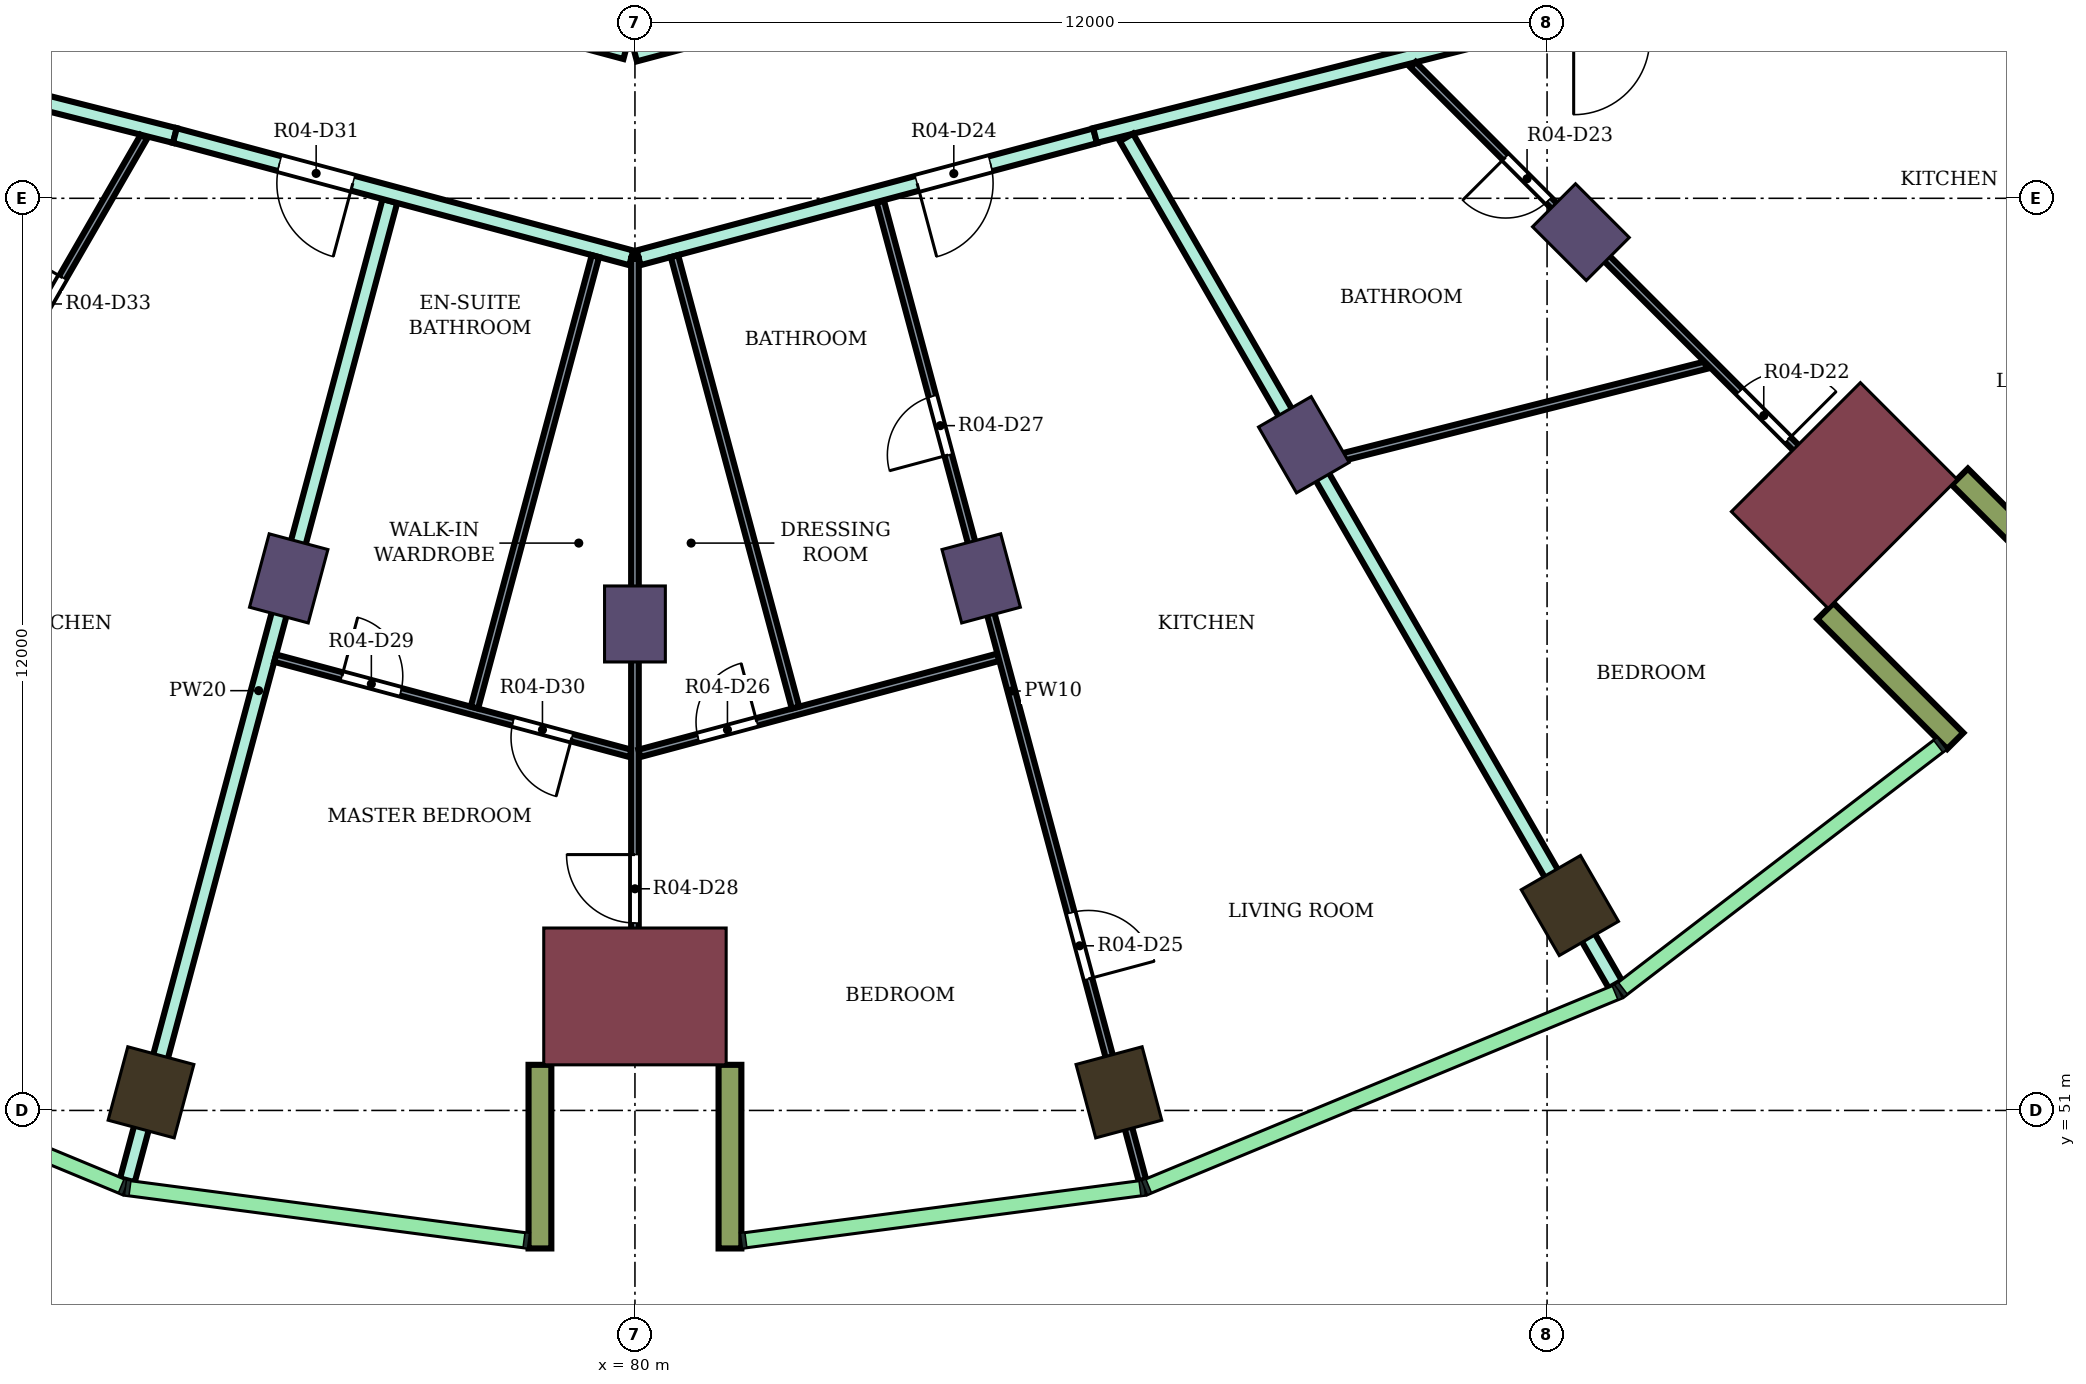
"""IFC4 building model, lengths in metres.
Left out: names, types, materials, properties, quantities, classifications, styles, units other than length and angle.
Written with IfcOpenShell. Run it as: python <this file> out.ifc"""

import sys

from ifc_helpers import new_model, si_unit, direction, frame, frame_2d, origin, origin_2d, place, context, subcontext, project, spatial, rectangle, extrude, element, fill, save


model = new_model("IFC4")
c1 = context("Model", 3, precision=1e-05, world=origin(), true_north=direction((0.0, 1.0)))
c2 = subcontext(c1, "Body", "Model", "MODEL_VIEW")
j1 = project(units=[si_unit("LENGTHUNIT", "METRE"), si_unit("PLANEANGLEUNIT", "RADIAN")], contexts=[c1])
p1 = place(None, origin())
s1 = spatial("IfcSite", under=j1, at=p1, CompositionType="ELEMENT")
p2 = place(p1, origin())
s2 = spatial("IfcBuilding", under=s1, at=p2, CompositionType="ELEMENT")
p3 = place(p2, frame((0.0, 0.0, 194.6)))
s3 = spatial("IfcBuildingStorey", under=s2, at=p3, CompositionType="ELEMENT", Elevation=194.6)
for number, where, z_axis, x_axis in (
    (1, (73.633, 51.238, 0.0), (0.0, 0.0, 1.0), (-0.259, -0.966, 0.0)),
    (2, (86.367, 51.238, 0.0), (0.0, 0.0, 1.0), (0.259, -0.966, 0.0)),
    (3, (92.3, 53.696, 0.0), (0.0, 0.0, 1.0), (0.5, -0.866, 0.0)),
):
    element("IfcColumn", number, at=place(p3, frame(where, z_axis=z_axis, x_axis=x_axis)), inside=s3, PredefinedType="COLUMN", context=c2, shape_type="SweptSolid", body=[
        extrude(rectangle(XDim=1.0, YDim=0.9, at=origin_2d()), origin(), (0.0, 0.0, 1.0), 4.1),
    ])
for number, where, z_axis, x_axis in (
    (4, (75.445, 58.0, 0.0), (0.0, 0.0, 1.0), (-0.259, -0.966, 0.0)),
    (5, (80.0, 57.4, 0.0), (0.0, 0.0, 1.0), (0.0, -1.0, 0.0)),
    (6, (84.555, 58.0, 0.0), (0.0, 0.0, 1.0), (0.259, -0.966, 0.0)),
    (7, (88.8, 59.758, 0.0), (0.0, 0.0, 1.0), (0.5, -0.866, 0.0)),
    (8, (92.445, 62.555, 0.0), (0.0, 0.0, 1.0), (0.707, -0.707, 0.0)),
):
    element("IfcColumn", number, at=place(p3, frame(where, z_axis=z_axis, x_axis=x_axis)), inside=s3, PredefinedType="COLUMN", context=c2, shape_type="SweptSolid", body=[
        extrude(rectangle(XDim=1.0, YDim=0.8, at=origin_2d()), origin(), (0.0, 0.0, 1.0), 4.1),
    ])
for number, where, z_axis, x_axis in (
    (9, (80.0, 52.5, 0.0), (0.0, 0.0, 1.0), (0.0, -1.0, 0.0)),
    (10, (95.91, 59.09, 0.0), (0.0, 0.0, 1.0), (0.707, -0.707, 0.0)),
):
    element("IfcColumn", number, at=place(p3, frame(where, z_axis=z_axis, x_axis=x_axis)), inside=s3, PredefinedType="COLUMN", context=c2, shape_type="SweptSolid", body=[
        extrude(rectangle(XDim=1.8, YDim=2.4, at=origin_2d()), origin(), (0.0, 0.0, 1.0), 4.1),
    ])
for number, where, z_axis, x_axis in (
    (11, (78.75, 51.6, 0.0), (0.0, 0.0, 1.0), (0.0, -1.0, 0.0)),
    (12, (81.25, 51.6, 0.0), (0.0, 0.0, 1.0), (0.0, -1.0, 0.0)),
    (13, (95.662, 57.57, 0.0), (0.0, 0.0, 1.0), (0.707, -0.707, 0.0)),
    (14, (97.43, 59.338, 0.0), (0.0, 0.0, 1.0), (0.707, -0.707, 0.0)),
):
    element("IfcWall", number, at=place(p3, frame(where, z_axis=z_axis, x_axis=x_axis)), inside=s3, PredefinedType="NOTDEFINED", context=c2, shape_type="SweptSolid", body=[
        extrude(rectangle(XDim=2.416, YDim=0.3, at=frame_2d((1.208, 0.0))), origin(), (0.0, 0.0, 1.0), 4.1),
    ])
p4 = place(p3, frame((68.2, 65.28, 0.0), z_axis=(0.0, 0.0, 1.0), x_axis=(0.969450596516, -0.245286650503, 0.0)))
e15 = element("IfcWall", 15, at=p4, inside=s3, PredefinedType="PARTITIONING", context=c2, shape_type="SweptSolid", body=[
    extrude(rectangle(XDim=5.928, YDim=0.2, at=frame_2d((2.964, 0.0))), origin(), (0.0, 0.0, 1.0), 3.65),
])
p5 = place(p3, frame((73.323, 50.081, 0.0), z_axis=(0.0, 0.0, 1.0), x_axis=(0.258888262922, 0.965907276772, 0.0)))
e16 = element("IfcWall", 16, at=p5, inside=s3, PredefinedType="PARTITIONING", context=c2, shape_type="SweptSolid", body=[
    extrude(rectangle(XDim=13.338, YDim=0.2, at=frame_2d((6.669, 0.0))), origin(), (0.0, 0.0, 1.0), 3.65),
])
p6 = place(p3, frame((73.947, 63.826, 0.0), z_axis=(0.0, 0.0, 1.0), x_axis=(0.965908253407, -0.258884619088, 0.0)))
e17 = element("IfcWall", 17, at=p6, inside=s3, PredefinedType="PARTITIONING", context=c2, shape_type="SweptSolid", body=[
    extrude(rectangle(XDim=6.217, YDim=0.2, at=frame_2d((3.108, 0.0))), origin(), (0.0, 0.0, 1.0), 3.65),
])
p7 = place(p6, frame((1.424, 0.0, 0.0)))
e18 = element("IfcOpeningElement", 18, at=p7, cuts=e17, PredefinedType="OPENING", context=c2, shape_type="SweptSolid", body=[
    extrude(rectangle(XDim=1.0, YDim=2.1, at=frame_2d((0.5, 1.05))), frame((0.0, 0.11, 0.0), z_axis=(0.0, -1.0, 0.0), x_axis=(1.0, 0.0, 0.0)), (0.0, 0.0, 1.0), 0.22),
])
p8 = place(p3, frame((74.603, 66.342, 0.0), z_axis=(0.0, 0.0, 1.0), x_axis=(0.965920893652, -0.258837453254, 0.0)))
e19 = element("IfcWall", 19, at=p8, inside=s3, PredefinedType="PARTITIONING", context=c2, shape_type="SweptSolid", body=[
    extrude(rectangle(XDim=5.458, YDim=0.2, at=frame_2d((2.729, 0.0))), origin(), (0.0, 0.0, 1.0), 3.65),
])
p9 = place(p8, frame((2.512, 0.0, 0.0)))
e20 = element("IfcOpeningElement", 20, at=p9, cuts=e19, PredefinedType="OPENING", context=c2, shape_type="SweptSolid", body=[
    extrude(rectangle(XDim=0.9, YDim=2.1, at=frame_2d((0.45, 1.05))), frame((0.0, 0.11, 0.0), z_axis=(0.0, -1.0, 0.0), x_axis=(1.0, 0.0, 0.0)), (0.0, 0.0, 1.0), 0.22),
])
p10 = place(p3, frame((80.048, 62.217, 0.0), z_axis=(0.0, 0.0, 1.0), x_axis=(0.966097920642, 0.258175923996, 0.0)))
e21 = element("IfcWall", 21, at=p10, inside=s3, PredefinedType="PARTITIONING", context=c2, shape_type="SweptSolid", body=[
    extrude(rectangle(XDim=6.217, YDim=0.2, at=frame_2d((3.108, 0.0))), origin(), (0.0, 0.0, 1.0), 3.65),
])
p11 = place(p10, frame((3.792, 0.0, 0.0)))
e22 = element("IfcOpeningElement", 22, at=p11, cuts=e21, PredefinedType="OPENING", context=c2, shape_type="SweptSolid", body=[
    extrude(rectangle(XDim=1.0, YDim=2.1, at=frame_2d((0.5, 1.05))), frame((0.0, 0.11, 0.0), z_axis=(0.0, -1.0, 0.0), x_axis=(1.0, 0.0, 0.0)), (0.0, 0.0, 1.0), 0.22),
])
p12 = place(p3, frame((80.0, 64.898, 0.0), z_axis=(0.0, 0.0, 1.0), x_axis=(0.966236923997, 0.25765520896, 0.0)))
e23 = element("IfcWall", 23, at=p12, inside=s3, PredefinedType="PARTITIONING", context=c2, shape_type="SweptSolid", body=[
    extrude(rectangle(XDim=8.168, YDim=0.2, at=frame_2d((4.084, 0.0))), origin(), (0.0, 0.0, 1.0), 3.65),
])
p13 = place(p12, frame((1.893, 0.0, 0.0)))
e24 = element("IfcOpeningElement", 24, at=p13, cuts=e23, PredefinedType="OPENING", context=c2, shape_type="SweptSolid", body=[
    extrude(rectangle(XDim=1.8, YDim=2.1, at=frame_2d((0.9, 1.05))), frame((0.0, 0.11, 0.0), z_axis=(0.0, -1.0, 0.0), x_axis=(1.0, 0.0, 0.0)), (0.0, 0.0, 1.0), 0.22),
])
p14 = place(p3, frame((86.053, 63.826, 0.0), z_axis=(0.0, 0.0, 1.0), x_axis=(0.969490004987, 0.245130843083, 0.0)))
e25 = element("IfcWall", 25, at=p14, inside=s3, PredefinedType="PARTITIONING", context=c2, shape_type="SweptSolid", body=[
    extrude(rectangle(XDim=5.908, YDim=0.2, at=frame_2d((2.954, 0.0))), origin(), (0.0, 0.0, 1.0), 3.65),
])
p15 = place(p3, frame((86.466, 63.801, 0.0), z_axis=(0.0, 0.0, 1.0), x_axis=(0.499937082171, -0.866061726362, 0.0)))
e26 = element("IfcWall", 26, at=p15, inside=s3, PredefinedType="PARTITIONING", context=c2, shape_type="SweptSolid", body=[
    extrude(rectangle(XDim=12.866, YDim=0.2, at=frame_2d((6.433, 0.0))), origin(), (0.0, 0.0, 1.0), 3.65),
])
p16 = place(p3, frame((67.101, 52.659, 0.0), z_axis=(0.0, 0.0, 1.0), x_axis=(0.500035926033, 0.866004660886, 0.0)))
e27 = element("IfcWall", 27, at=p16, inside=s3, PredefinedType="PARTITIONING", context=c2, shape_type="SweptSolid", body=[
    extrude(rectangle(XDim=12.876, YDim=0.1, at=frame_2d((6.438, 0.0))), origin(), (0.0, 0.0, 1.0), 3.65),
])
p17 = place(p16, frame((2.401, 0.0, 0.0)))
e28 = element("IfcOpeningElement", 28, at=p17, cuts=e27, PredefinedType="OPENING", context=c2, shape_type="SweptSolid", body=[
    extrude(rectangle(XDim=0.9, YDim=2.1, at=frame_2d((0.45, 1.05))), frame((0.0, 0.06, 0.0), z_axis=(0.0, -1.0, 0.0), x_axis=(1.0, 0.0, 0.0)), (0.0, 0.0, 1.0), 0.12),
])
p18 = place(p16, frame((9.936, 0.0, 0.0)))
e29 = element("IfcOpeningElement", 29, at=p18, cuts=e27, PredefinedType="OPENING", context=c2, shape_type="SweptSolid", body=[
    extrude(rectangle(XDim=0.8, YDim=2.1, at=frame_2d((0.4, 1.05))), frame((0.0, 0.06, 0.0), z_axis=(0.0, -1.0, 0.0), x_axis=(1.0, 0.0, 0.0)), (0.0, 0.0, 1.0), 0.12),
])
p19 = place(p3, frame((75.267, 56.95, 0.0), z_axis=(0.0, 0.0, 1.0), x_axis=(0.965900084933, -0.25891509405, 0.0)))
e30 = element("IfcWall", 30, at=p19, inside=s3, PredefinedType="PARTITIONING", context=c2, shape_type="SweptSolid", body=[
    extrude(rectangle(XDim=4.84, YDim=0.1, at=frame_2d((2.42, 0.0))), origin(), (0.0, 0.0, 1.0), 3.65),
])
p20 = place(p19, frame((0.91, 0.0, 0.0)))
e31 = element("IfcOpeningElement", 31, at=p20, cuts=e30, PredefinedType="OPENING", context=c2, shape_type="SweptSolid", body=[
    extrude(rectangle(XDim=0.8, YDim=2.1, at=frame_2d((0.4, 1.05))), frame((0.0, 0.06, 0.0), z_axis=(0.0, -1.0, 0.0), x_axis=(1.0, 0.0, 0.0)), (0.0, 0.0, 1.0), 0.12),
])
p21 = place(p19, frame((3.24, 0.0, 0.0)))
e32 = element("IfcOpeningElement", 32, at=p21, cuts=e30, PredefinedType="OPENING", context=c2, shape_type="SweptSolid", body=[
    extrude(rectangle(XDim=0.8, YDim=2.1, at=frame_2d((0.4, 1.05))), frame((0.0, 0.06, 0.0), z_axis=(0.0, -1.0, 0.0), x_axis=(1.0, 0.0, 0.0)), (0.0, 0.0, 1.0), 0.12),
])
p22 = place(p3, frame((77.888, 56.3, 0.0), z_axis=(0.0, 0.0, 1.0), x_axis=(0.258885575383, 0.965907997098, 0.0)))
e33 = element("IfcWall", 33, at=p22, inside=s3, PredefinedType="PARTITIONING", context=c2, shape_type="SweptSolid", body=[
    extrude(rectangle(XDim=6.15, YDim=0.1, at=frame_2d((3.075, 0.0))), origin(), (0.0, 0.0, 1.0), 3.65),
])
p23 = place(p3, frame((80.0, 51.8, 0.0), z_axis=(0.0, 0.0, 1.0), x_axis=(0.0, 1.0, 0.0)))
e34 = element("IfcWall", 34, at=p23, inside=s3, PredefinedType="PARTITIONING", context=c2, shape_type="SweptSolid", body=[
    extrude(rectangle(XDim=10.404, YDim=0.1, at=frame_2d((5.202, 0.0))), origin(), (0.0, 0.0, 1.0), 3.65),
])
p24 = place(p23, frame((1.666, 0.0, 0.0)))
e35 = element("IfcOpeningElement", 35, at=p24, cuts=e34, PredefinedType="OPENING", context=c2, shape_type="SweptSolid", body=[
    extrude(rectangle(XDim=0.9, YDim=2.1, at=frame_2d((0.45, 1.05))), frame((0.0, 0.06, 0.0), z_axis=(0.0, -1.0, 0.0), x_axis=(1.0, 0.0, 0.0)), (0.0, 0.0, 1.0), 0.12),
])
p25 = place(p3, frame((80.058, 55.698, 0.0), z_axis=(0.0, 0.0, 1.0), x_axis=(0.965970105839, 0.258653734992, 0.0)))
e36 = element("IfcWall", 36, at=p25, inside=s3, PredefinedType="PARTITIONING", context=c2, shape_type="SweptSolid", body=[
    extrude(rectangle(XDim=4.89, YDim=0.1, at=frame_2d((2.445, 0.0))), origin(), (0.0, 0.0, 1.0), 3.65),
])
p26 = place(p25, frame((0.8, 0.0, 0.0)))
e37 = element("IfcOpeningElement", 37, at=p26, cuts=e36, PredefinedType="OPENING", context=c2, shape_type="SweptSolid", body=[
    extrude(rectangle(XDim=0.8, YDim=2.1, at=frame_2d((0.4, 1.05))), frame((0.0, 0.06, 0.0), z_axis=(0.0, -1.0, 0.0), x_axis=(1.0, 0.0, 0.0)), (0.0, 0.0, 1.0), 0.12),
])
p27 = place(p3, frame((80.52, 62.24, 0.0), z_axis=(0.0, 0.0, 1.0), x_axis=(0.258885575383, -0.965907997098, 0.0)))
e38 = element("IfcWall", 38, at=p27, inside=s3, PredefinedType="PARTITIONING", context=c2, shape_type="SweptSolid", body=[
    extrude(rectangle(XDim=6.15, YDim=0.1, at=frame_2d((3.075, 0.0))), origin(), (0.0, 0.0, 1.0), 3.65),
])
p28 = place(p3, frame((83.228, 62.955, 0.0), z_axis=(0.0, 0.0, 1.0), x_axis=(0.258737611245, -0.965947642746, 0.0)))
e39 = element("IfcWall", 39, at=p28, inside=s3, PredefinedType="PARTITIONING", context=c2, shape_type="SweptSolid", body=[
    extrude(rectangle(XDim=13.328, YDim=0.1, at=frame_2d((6.664, 0.0))), origin(), (0.0, 0.0, 1.0), 3.65),
])
p29 = place(p28, frame((9.684, 0.0, 0.0)))
e40 = element("IfcOpeningElement", 40, at=p29, cuts=e39, PredefinedType="OPENING", context=c2, shape_type="SweptSolid", body=[
    extrude(rectangle(XDim=0.9, YDim=2.1, at=frame_2d((0.45, 1.05))), frame((0.0, 0.06, 0.0), z_axis=(0.0, -1.0, 0.0), x_axis=(1.0, 0.0, 0.0)), (0.0, 0.0, 1.0), 0.12),
])
p30 = place(p28, frame((2.65, 0.0, 0.0)))
e41 = element("IfcOpeningElement", 41, at=p30, cuts=e39, PredefinedType="OPENING", context=c2, shape_type="SweptSolid", body=[
    extrude(rectangle(XDim=0.8, YDim=2.1, at=frame_2d((0.4, 1.05))), frame((0.0, 0.06, 0.0), z_axis=(0.0, -1.0, 0.0), x_axis=(1.0, 0.0, 0.0)), (0.0, 0.0, 1.0), 0.12),
])
p31 = place(p3, frame((89.054, 59.531, 0.0), z_axis=(0.0, 0.0, 1.0), x_axis=(0.969472150829, 0.245201445279, 0.0)))
e42 = element("IfcWall", 42, at=p31, inside=s3, PredefinedType="PARTITIONING", context=c2, shape_type="SweptSolid", body=[
    extrude(rectangle(XDim=5.191, YDim=0.1, at=frame_2d((2.596, 0.0))), origin(), (0.0, 0.0, 1.0), 3.65),
])
p32 = place(p3, frame((90.236, 64.758, 0.0), z_axis=(0.0, 0.0, 1.0), x_axis=(0.706952774706, -0.707260754132, 0.0)))
e43 = element("IfcWall", 43, at=p32, inside=s3, PredefinedType="PARTITIONING", context=c2, shape_type="SweptSolid", body=[
    extrude(rectangle(XDim=8.72, YDim=0.1, at=frame_2d((4.36, 0.0))), origin(), (0.0, 0.0, 1.0), 3.65),
])
p33 = place(p32, frame((6.077, 0.0, 0.0)))
e44 = element("IfcOpeningElement", 44, at=p33, cuts=e43, PredefinedType="OPENING", context=c2, shape_type="SweptSolid", body=[
    extrude(rectangle(XDim=0.9, YDim=2.1, at=frame_2d((0.45, 1.05))), frame((0.0, 0.06, 0.0), z_axis=(0.0, -1.0, 0.0), x_axis=(1.0, 0.0, 0.0)), (0.0, 0.0, 1.0), 0.12),
])
p34 = place(p32, frame((1.722, 0.0, 0.0)))
e45 = element("IfcOpeningElement", 45, at=p34, cuts=e43, PredefinedType="OPENING", context=c2, shape_type="SweptSolid", body=[
    extrude(rectangle(XDim=0.8, YDim=2.1, at=frame_2d((0.4, 1.05))), frame((0.0, 0.06, 0.0), z_axis=(0.0, -1.0, 0.0), x_axis=(1.0, 0.0, 0.0)), (0.0, 0.0, 1.0), 0.12),
])
p35 = place(p33, origin())
e46 = element("IfcDoor", 46, at=p35, inside=s3, OperationType="SINGLE_SWING_RIGHT", PredefinedType="DOOR", context=c2, shape_type="SweptSolid", body=[
    extrude(rectangle(XDim=0.9, YDim=2.1, at=frame_2d((0.45, 1.05))), frame((0.0, 0.025, 0.0), z_axis=(0.0, -1.0, 0.0), x_axis=(1.0, 0.0, 0.0)), (0.0, 0.0, 1.0), 0.05),
])
fill(e44, e46)
p36 = place(p34, frame((0.8, 0.0, 0.0), z_axis=(0.0, 0.0, 1.0), x_axis=(-1.0, 0.0, 0.0)))
e47 = element("IfcDoor", 47, at=p36, inside=s3, OperationType="SINGLE_SWING_RIGHT", PredefinedType="DOOR", context=c2, shape_type="SweptSolid", body=[
    extrude(rectangle(XDim=0.8, YDim=2.1, at=frame_2d((0.4, 1.05))), frame((0.0, 0.025, 0.0), z_axis=(0.0, -1.0, 0.0), x_axis=(1.0, 0.0, 0.0)), (0.0, 0.0, 1.0), 0.05),
])
fill(e45, e47)
p37 = place(p11, frame((1.0, 0.0, 0.0), z_axis=(0.0, 0.0, 1.0), x_axis=(-1.0, 0.0, 0.0)))
e48 = element("IfcDoor", 48, at=p37, inside=s3, OperationType="SINGLE_SWING_RIGHT", PredefinedType="DOOR", context=c2, shape_type="SweptSolid", body=[
    extrude(rectangle(XDim=1.0, YDim=2.1, at=frame_2d((0.5, 1.05))), frame((0.0, 0.025, 0.0), z_axis=(0.0, -1.0, 0.0), x_axis=(1.0, 0.0, 0.0)), (0.0, 0.0, 1.0), 0.05),
])
fill(e22, e48)
p38 = place(p29, origin())
e49 = element("IfcDoor", 49, at=p38, inside=s3, OperationType="SINGLE_SWING_RIGHT", PredefinedType="DOOR", context=c2, shape_type="SweptSolid", body=[
    extrude(rectangle(XDim=0.9, YDim=2.1, at=frame_2d((0.45, 1.05))), frame((0.0, 0.025, 0.0), z_axis=(0.0, -1.0, 0.0), x_axis=(1.0, 0.0, 0.0)), (0.0, 0.0, 1.0), 0.05),
])
fill(e40, e49)
p39 = place(p26, origin())
e50 = element("IfcDoor", 50, at=p39, inside=s3, OperationType="SINGLE_SWING_RIGHT", PredefinedType="DOOR", context=c2, shape_type="SweptSolid", body=[
    extrude(rectangle(XDim=0.8, YDim=2.1, at=frame_2d((0.4, 1.05))), frame((0.0, 0.025, 0.0), z_axis=(0.0, -1.0, 0.0), x_axis=(1.0, 0.0, 0.0)), (0.0, 0.0, 1.0), 0.05),
])
fill(e37, e50)
p40 = place(p30, frame((0.8, 0.0, 0.0), z_axis=(0.0, 0.0, 1.0), x_axis=(-1.0, 0.0, 0.0)))
e51 = element("IfcDoor", 51, at=p40, inside=s3, OperationType="SINGLE_SWING_LEFT", PredefinedType="DOOR", context=c2, shape_type="SweptSolid", body=[
    extrude(rectangle(XDim=0.8, YDim=2.1, at=frame_2d((0.4, 1.05))), frame((0.0, 0.025, 0.0), z_axis=(0.0, -1.0, 0.0), x_axis=(1.0, 0.0, 0.0)), (0.0, 0.0, 1.0), 0.05),
])
fill(e41, e51)
p41 = place(p24, origin())
e52 = element("IfcDoor", 52, at=p41, inside=s3, OperationType="SINGLE_SWING_RIGHT", PredefinedType="DOOR", context=c2, shape_type="SweptSolid", body=[
    extrude(rectangle(XDim=0.9, YDim=2.1, at=frame_2d((0.45, 1.05))), frame((0.0, 0.025, 0.0), z_axis=(0.0, -1.0, 0.0), x_axis=(1.0, 0.0, 0.0)), (0.0, 0.0, 1.0), 0.05),
])
fill(e35, e52)
p42 = place(p20, origin())
e53 = element("IfcDoor", 53, at=p42, inside=s3, OperationType="SINGLE_SWING_LEFT", PredefinedType="DOOR", context=c2, shape_type="SweptSolid", body=[
    extrude(rectangle(XDim=0.8, YDim=2.1, at=frame_2d((0.4, 1.05))), frame((0.0, 0.025, 0.0), z_axis=(0.0, -1.0, 0.0), x_axis=(1.0, 0.0, 0.0)), (0.0, 0.0, 1.0), 0.05),
])
fill(e31, e53)
p43 = place(p21, frame((0.8, 0.0, 0.0), z_axis=(0.0, 0.0, 1.0), x_axis=(-1.0, 0.0, 0.0)))
e54 = element("IfcDoor", 54, at=p43, inside=s3, OperationType="SINGLE_SWING_LEFT", PredefinedType="DOOR", context=c2, shape_type="SweptSolid", body=[
    extrude(rectangle(XDim=0.8, YDim=2.1, at=frame_2d((0.4, 1.05))), frame((0.0, 0.025, 0.0), z_axis=(0.0, -1.0, 0.0), x_axis=(1.0, 0.0, 0.0)), (0.0, 0.0, 1.0), 0.05),
])
fill(e32, e54)
p44 = place(p7, frame((1.0, 0.0, 0.0), z_axis=(0.0, 0.0, 1.0), x_axis=(-1.0, 0.0, 0.0)))
e55 = element("IfcDoor", 55, at=p44, inside=s3, OperationType="SINGLE_SWING_LEFT", PredefinedType="DOOR", context=c2, shape_type="SweptSolid", body=[
    extrude(rectangle(XDim=1.0, YDim=2.1, at=frame_2d((0.5, 1.05))), frame((0.0, 0.025, 0.0), z_axis=(0.0, -1.0, 0.0), x_axis=(1.0, 0.0, 0.0)), (0.0, 0.0, 1.0), 0.05),
])
fill(e18, e55)
p45 = place(p18, origin())
e56 = element("IfcDoor", 56, at=p45, inside=s3, OperationType="SINGLE_SWING_RIGHT", PredefinedType="DOOR", context=c2, shape_type="SweptSolid", body=[
    extrude(rectangle(XDim=0.8, YDim=2.1, at=frame_2d((0.4, 1.05))), frame((0.0, 0.025, 0.0), z_axis=(0.0, -1.0, 0.0), x_axis=(1.0, 0.0, 0.0)), (0.0, 0.0, 1.0), 0.05),
])
fill(e29, e56)
save(model, sys.argv[1])
